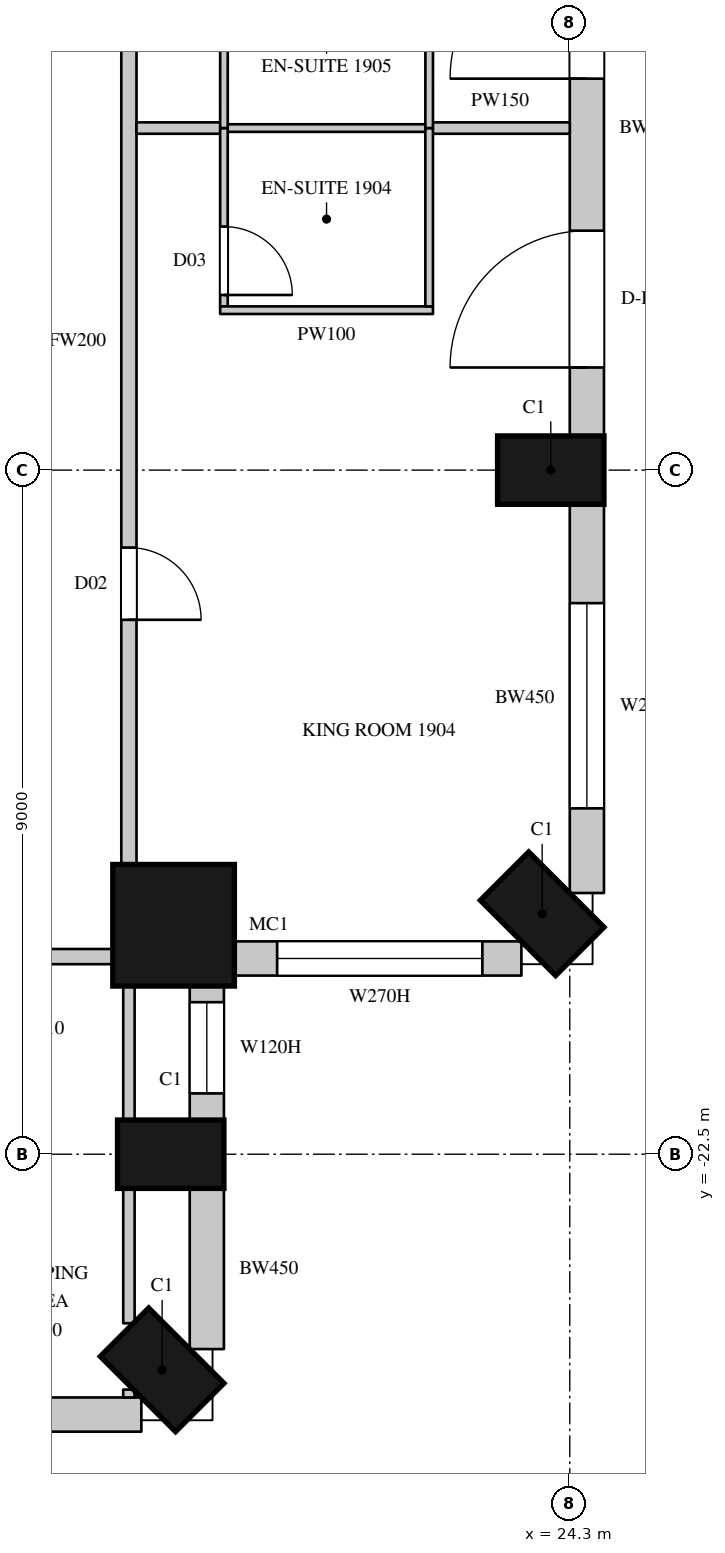
"""IFC4 building model, lengths in metres.
Left out: names, types, materials, properties, quantities, classifications, styles, units other than length and angle.
Written with IfcOpenShell. Run it as: python <this file> out.ifc"""

import sys

from ifc_helpers import new_model, si_unit, direction, frame, frame_2d, origin, origin_2d, place, context, subcontext, project, spatial, rectangle, circle, extrude, element, fill, save


model = new_model("IFC4")
c1 = context("Model", 3, precision=1e-05, world=origin(), true_north=direction((0.0, 1.0)))
c2 = subcontext(c1, "Body", "Model", "MODEL_VIEW")
j1 = project(units=[si_unit("LENGTHUNIT", "METRE"), si_unit("PLANEANGLEUNIT", "RADIAN")], contexts=[c1])
p1 = place(None, origin())
s1 = spatial("IfcSite", under=j1, at=p1, CompositionType="ELEMENT")
p2 = place(p1, origin())
s2 = spatial("IfcBuilding", under=s1, at=p2, CompositionType="ELEMENT")
p3 = place(p2, frame((0.0, 0.0, 98.7)))
s3 = spatial("IfcBuildingStorey", under=s2, at=p3, CompositionType="ELEMENT", Elevation=98.7)
for number, where, z_axis, x_axis in (
    (1, (18.937, -25.337, 0.0), (0.0, 0.0, 1.0), (0.707, 0.707, 0.0)),
    (2, (19.05, -22.5, 0.0), (0.0, 0.0, 1.0), (0.0, 1.0, 0.0)),
):
    element("IfcColumn", number, at=place(p3, frame(where, z_axis=z_axis, x_axis=x_axis)), inside=s3, PredefinedType="COLUMN", context=c2, shape_type="SweptSolid", body=[
        extrude(rectangle(XDim=0.9, YDim=1.4, at=origin_2d()), origin(), (0.0, 0.0, 1.0), 3.6),
    ])
p4 = place(p3, frame((19.088, -19.488, 0.0), z_axis=(0.0, 0.0, 1.0), x_axis=(1.0, 0.0, 0.0)))
e3 = element("IfcColumn", 3, at=p4, inside=s3, PredefinedType="COLUMN", context=c2, shape_type="SweptSolid", body=[
    extrude(circle(Radius=0.8, at=origin_2d()), origin(), (0.0, 0.0, 1.0), 3.6),
])
for number, where, z_axis, x_axis in (
    (4, (23.937, -19.337, 0.0), (0.0, 0.0, 1.0), (0.707, 0.707, 0.0)),
    (5, (24.05, -13.5, 0.0), (0.0, 0.0, 1.0), (0.0, 1.0, 0.0)),
):
    element("IfcColumn", number, at=place(p3, frame(where, z_axis=z_axis, x_axis=x_axis)), inside=s3, PredefinedType="COLUMN", context=c2, shape_type="SweptSolid", body=[
        extrude(rectangle(XDim=0.9, YDim=1.4, at=origin_2d()), origin(), (0.0, 0.0, 1.0), 3.6),
    ])
p5 = place(p3, frame((15.75, -25.925, 0.0), z_axis=(0.0, 0.0, 1.0), x_axis=(1.0, 0.0, 0.0)))
e6 = element("IfcWall", 6, at=p5, inside=s3, PredefinedType="SOLIDWALL", context=c2, shape_type="SweptSolid", body=[
    extrude(rectangle(XDim=2.914, YDim=0.45, at=frame_2d((1.457, 0.0))), origin(), (0.0, 0.0, 1.0), 3.3),
])
p6 = place(p3, frame((19.525, -25.064, 0.0), z_axis=(0.0, 0.0, 1.0), x_axis=(0.0, 1.0, 0.0)))
e7 = element("IfcWall", 7, at=p6, inside=s3, PredefinedType="SOLIDWALL", context=c2, shape_type="SweptSolid", body=[
    extrude(rectangle(XDim=2.114, YDim=0.45, at=frame_2d((1.057, 0.0))), origin(), (0.0, 0.0, 1.0), 3.3),
])
p7 = place(p3, frame((19.525, -22.05, 0.0), z_axis=(0.0, 0.0, 1.0), x_axis=(0.0, 1.0, 0.0)))
e8 = element("IfcWall", 8, at=p7, inside=s3, PredefinedType="SOLIDWALL", context=c2, shape_type="SweptSolid", body=[
    extrude(rectangle(XDim=1.792, YDim=0.45, at=frame_2d((0.896, 0.0))), origin(), (0.0, 0.0, 1.0), 3.3),
])
p8 = place(p7, frame((0.35, 0.0, 1.05)))
e9 = element("IfcOpeningElement", 9, at=p8, cuts=e8, PredefinedType="OPENING", context=c2, shape_type="SweptSolid", body=[
    extrude(rectangle(XDim=1.2, YDim=2.0, at=frame_2d((0.6, 1.0))), frame((0.0, 0.235, 0.0), z_axis=(0.0, -1.0, 0.0), x_axis=(1.0, 0.0, 0.0)), (0.0, 0.0, 1.0), 0.47),
])
p9 = place(p3, frame((19.858, -19.925, 0.0), z_axis=(0.0, 0.0, 1.0), x_axis=(1.0, 0.0, 0.0)))
e10 = element("IfcWall", 10, at=p9, inside=s3, PredefinedType="SOLIDWALL", context=c2, shape_type="SweptSolid", body=[
    extrude(rectangle(XDim=3.805, YDim=0.45, at=frame_2d((1.903, 0.0))), origin(), (0.0, 0.0, 1.0), 3.3),
])
p10 = place(p9, frame((0.592, 0.0, 1.05)))
e11 = element("IfcOpeningElement", 11, at=p10, cuts=e10, PredefinedType="OPENING", context=c2, shape_type="SweptSolid", body=[
    extrude(rectangle(XDim=2.7, YDim=2.0, at=frame_2d((1.35, 1.0))), frame((0.0, 0.235, 0.0), z_axis=(0.0, -1.0, 0.0), x_axis=(1.0, 0.0, 0.0)), (0.0, 0.0, 1.0), 0.47),
])
p11 = place(p3, frame((24.525, -19.064, 0.0), z_axis=(0.0, 0.0, 1.0), x_axis=(0.0, 1.0, 0.0)))
e12 = element("IfcWall", 12, at=p11, inside=s3, PredefinedType="SOLIDWALL", context=c2, shape_type="SweptSolid", body=[
    extrude(rectangle(XDim=5.114, YDim=0.45, at=frame_2d((2.557, 0.0))), origin(), (0.0, 0.0, 1.0), 3.3),
])
p12 = place(p11, frame((1.114, 0.0, 1.05)))
e13 = element("IfcOpeningElement", 13, at=p12, cuts=e12, PredefinedType="OPENING", context=c2, shape_type="SweptSolid", body=[
    extrude(rectangle(XDim=2.7, YDim=2.0, at=frame_2d((1.35, 1.0))), frame((0.0, 0.235, 0.0), z_axis=(0.0, -1.0, 0.0), x_axis=(1.0, 0.0, 0.0)), (0.0, 0.0, 1.0), 0.47),
])
p13 = place(p3, frame((24.525, -13.05, 0.0), z_axis=(0.0, 0.0, 1.0), x_axis=(0.0, 1.0, 0.0)))
e14 = element("IfcWall", 14, at=p13, inside=s3, PredefinedType="SOLIDWALL", context=c2, shape_type="SweptSolid", body=[
    extrude(rectangle(XDim=8.1, YDim=0.45, at=frame_2d((4.05, 0.0))), origin(), (0.0, 0.0, 1.0), 3.3),
])
p14 = place(p13, frame((0.9, 0.0, 0.0)))
e15 = element("IfcOpeningElement", 15, at=p14, cuts=e14, PredefinedType="OPENING", context=c2, shape_type="SweptSolid", body=[
    extrude(rectangle(XDim=1.8, YDim=2.4, at=frame_2d((0.9, 1.2))), frame((0.0, 0.235, 0.0), z_axis=(0.0, -1.0, 0.0), x_axis=(1.0, 0.0, 0.0)), (0.0, 0.0, 1.0), 0.47),
])
p15 = place(p13, frame((4.7, 0.0, 0.0)))
e16 = element("IfcOpeningElement", 16, at=p15, cuts=e14, PredefinedType="OPENING", context=c2, shape_type="SweptSolid", body=[
    extrude(rectangle(XDim=1.8, YDim=2.4, at=frame_2d((0.9, 1.2))), frame((0.0, 0.235, 0.0), z_axis=(0.0, -1.0, 0.0), x_axis=(1.0, 0.0, 0.0)), (0.0, 0.0, 1.0), 0.47),
])
p16 = place(p13, frame((6.7, 0.0, 1.05)))
e17 = element("IfcOpeningElement", 17, at=p16, cuts=e14, PredefinedType="OPENING", context=c2, shape_type="SweptSolid", body=[
    extrude(rectangle(XDim=1.2, YDim=2.0, at=frame_2d((0.6, 1.0))), frame((0.0, 0.235, 0.0), z_axis=(0.0, -1.0, 0.0), x_axis=(1.0, 0.0, 0.0)), (0.0, 0.0, 1.0), 0.47),
])
p17 = place(p3, frame((-23.765, -19.9, 0.0), z_axis=(0.0, 0.0, 1.0), x_axis=(1.0, 0.0, 0.0)))
e18 = element("IfcWall", 18, at=p17, inside=s3, PredefinedType="PARTITIONING", context=c2, shape_type="SweptSolid", body=[
    extrude(rectangle(XDim=42.125, YDim=0.2, at=frame_2d((21.063, 0.0))), origin(), (0.0, 0.0, 1.0), 3.3),
])
p18 = place(p17, frame((6.2, 0.0, 0.0)))
e19 = element("IfcOpeningElement", 19, at=p18, cuts=e18, PredefinedType="OPENING", context=c2, shape_type="SweptSolid", body=[
    extrude(rectangle(XDim=0.95, YDim=2.2, at=frame_2d((0.475, 1.1))), frame((0.0, 0.11, 0.0), z_axis=(0.0, -1.0, 0.0), x_axis=(1.0, 0.0, 0.0)), (0.0, 0.0, 1.0), 0.22),
])
p19 = place(p17, frame((14.1, 0.0, 0.0)))
e20 = element("IfcOpeningElement", 20, at=p19, cuts=e18, PredefinedType="OPENING", context=c2, shape_type="SweptSolid", body=[
    extrude(rectangle(XDim=1.1, YDim=2.4, at=frame_2d((0.55, 1.2))), frame((0.0, 0.11, 0.0), z_axis=(0.0, -1.0, 0.0), x_axis=(1.0, 0.0, 0.0)), (0.0, 0.0, 1.0), 0.22),
])
p20 = place(p17, frame((24.2, 0.0, 0.0)))
e21 = element("IfcOpeningElement", 21, at=p20, cuts=e18, PredefinedType="OPENING", context=c2, shape_type="SweptSolid", body=[
    extrude(rectangle(XDim=0.95, YDim=2.2, at=frame_2d((0.475, 1.1))), frame((0.0, 0.11, 0.0), z_axis=(0.0, -1.0, 0.0), x_axis=(1.0, 0.0, 0.0)), (0.0, 0.0, 1.0), 0.22),
])
p21 = place(p17, frame((32.9, 0.0, 0.0)))
e22 = element("IfcOpeningElement", 22, at=p21, cuts=e18, PredefinedType="OPENING", context=c2, shape_type="SweptSolid", body=[
    extrude(rectangle(XDim=1.1, YDim=2.4, at=frame_2d((0.55, 1.2))), frame((0.0, 0.11, 0.0), z_axis=(0.0, -1.0, 0.0), x_axis=(1.0, 0.0, 0.0)), (0.0, 0.0, 1.0), 0.22),
])
p22 = place(p3, frame((18.5, -18.869, 0.0), z_axis=(0.0, 0.0, 1.0), x_axis=(0.0, 1.0, 0.0)))
e23 = element("IfcWall", 23, at=p22, inside=s3, PredefinedType="PARTITIONING", context=c2, shape_type="SweptSolid", body=[
    extrude(rectangle(XDim=14.119, YDim=0.2, at=frame_2d((7.06, 0.0))), origin(), (0.0, 0.0, 1.0), 3.3),
])
p23 = place(p22, frame((3.4, 0.0, 0.0)))
e24 = element("IfcOpeningElement", 24, at=p23, cuts=e23, PredefinedType="OPENING", context=c2, shape_type="SweptSolid", body=[
    extrude(rectangle(XDim=0.95, YDim=2.2, at=frame_2d((0.475, 1.1))), frame((0.0, 0.11, 0.0), z_axis=(0.0, -1.0, 0.0), x_axis=(1.0, 0.0, 0.0)), (0.0, 0.0, 1.0), 0.22),
])
p24 = place(p22, frame((12.8, 0.0, 0.0)))
e25 = element("IfcOpeningElement", 25, at=p24, cuts=e23, PredefinedType="OPENING", context=c2, shape_type="SweptSolid", body=[
    extrude(rectangle(XDim=0.95, YDim=2.2, at=frame_2d((0.475, 1.1))), frame((0.0, 0.11, 0.0), z_axis=(0.0, -1.0, 0.0), x_axis=(1.0, 0.0, 0.0)), (0.0, 0.0, 1.0), 0.22),
])
p25 = place(p3, frame((18.5, -25.7, 0.0), z_axis=(0.0, 0.0, 1.0), x_axis=(0.0, 1.0, 0.0)))
e26 = element("IfcWall", 26, at=p25, inside=s3, PredefinedType="PARTITIONING", context=c2, shape_type="SweptSolid", body=[
    extrude(rectangle(XDim=0.104, YDim=0.15, at=frame_2d((0.052, 0.0))), origin(), (0.0, 0.0, 1.0), 3.3),
])
p26 = place(p3, frame((18.5, -24.724, 0.0), z_axis=(0.0, 0.0, 1.0), x_axis=(0.0, 1.0, 0.0)))
e27 = element("IfcWall", 27, at=p26, inside=s3, PredefinedType="PARTITIONING", context=c2, shape_type="SweptSolid", body=[
    extrude(rectangle(XDim=1.774, YDim=0.15, at=frame_2d((0.887, 0.0))), origin(), (0.0, 0.0, 1.0), 3.3),
])
p27 = place(p3, frame((18.5, -22.05, 0.0), z_axis=(0.0, 0.0, 1.0), x_axis=(0.0, 1.0, 0.0)))
e28 = element("IfcWall", 28, at=p27, inside=s3, PredefinedType="PARTITIONING", context=c2, shape_type="SweptSolid", body=[
    extrude(rectangle(XDim=1.964, YDim=0.15, at=frame_2d((0.982, 0.0))), origin(), (0.0, 0.0, 1.0), 3.3),
])
p28 = place(p3, frame((18.6, -9.0, 0.0), z_axis=(0.0, 0.0, 1.0), x_axis=(1.0, 0.0, 0.0)))
e29 = element("IfcWall", 29, at=p28, inside=s3, PredefinedType="PARTITIONING", context=c2, shape_type="SweptSolid", body=[
    extrude(rectangle(XDim=1.13, YDim=0.15, at=frame_2d((0.565, 0.0))), origin(), (0.0, 0.0, 1.0), 2.65),
])
p29 = place(p3, frame((22.47, -9.0, 0.0), z_axis=(0.0, 0.0, 1.0), x_axis=(1.0, 0.0, 0.0)))
e30 = element("IfcWall", 30, at=p29, inside=s3, PredefinedType="PARTITIONING", context=c2, shape_type="SweptSolid", body=[
    extrude(rectangle(XDim=1.83, YDim=0.15, at=frame_2d((0.915, 0.0))), origin(), (0.0, 0.0, 1.0), 2.65),
])
p30 = place(p3, frame((19.73, -9.0, 0.0), z_axis=(0.0, 0.0, 1.0), x_axis=(1.0, 0.0, 0.0)))
e31 = element("IfcWall", 31, at=p30, inside=s3, PredefinedType="PARTITIONING", context=c2, shape_type="SweptSolid", body=[
    extrude(rectangle(XDim=2.74, YDim=0.1, at=frame_2d((1.37, 0.0))), origin(), (0.0, 0.0, 1.0), 2.65),
])
p31 = place(p3, frame((19.75, -11.346, 0.0), z_axis=(0.0, 0.0, 1.0), x_axis=(0.0, 1.0, 0.0)))
e32 = element("IfcWall", 32, at=p31, inside=s3, PredefinedType="PARTITIONING", context=c2, shape_type="SweptSolid", body=[
    extrude(rectangle(XDim=2.346, YDim=0.1, at=frame_2d((1.173, 0.0))), origin(), (0.0, 0.0, 1.0), 3.3),
])
p32 = place(p31, frame((0.15, 0.0, 0.0)))
e33 = element("IfcOpeningElement", 33, at=p32, cuts=e32, PredefinedType="OPENING", context=c2, shape_type="SweptSolid", body=[
    extrude(rectangle(XDim=0.9, YDim=2.2, at=frame_2d((0.45, 1.1))), frame((0.0, 0.06, 0.0), z_axis=(0.0, -1.0, 0.0), x_axis=(1.0, 0.0, 0.0)), (0.0, 0.0, 1.0), 0.12),
])
p33 = place(p3, frame((19.7, -11.396, 0.0), z_axis=(0.0, 0.0, 1.0), x_axis=(1.0, 0.0, 0.0)))
e34 = element("IfcWall", 34, at=p33, inside=s3, PredefinedType="PARTITIONING", context=c2, shape_type="SweptSolid", body=[
    extrude(rectangle(XDim=2.8, YDim=0.1, at=frame_2d((1.4, 0.0))), origin(), (0.0, 0.0, 1.0), 3.3),
])
p34 = place(p3, frame((19.75, -9.0, 0.0), z_axis=(0.0, 0.0, 1.0), x_axis=(0.000399241409, 0.999999920303, 0.0)))
e35 = element("IfcWall", 35, at=p34, inside=s3, PredefinedType="PARTITIONING", context=c2, shape_type="SweptSolid", body=[
    extrude(rectangle(XDim=2.446, YDim=0.1, at=frame_2d((1.223, 0.0))), origin(), (0.0, 0.0, 1.0), 3.3),
])
p35 = place(p34, frame((1.3, 0.0, 0.0)))
e36 = element("IfcOpeningElement", 36, at=p35, cuts=e35, PredefinedType="OPENING", context=c2, shape_type="SweptSolid", body=[
    extrude(rectangle(XDim=0.9, YDim=2.2, at=frame_2d((0.45, 1.1))), frame((0.0, 0.06, 0.0), z_axis=(0.0, -1.0, 0.0), x_axis=(1.0, 0.0, 0.0)), (0.0, 0.0, 1.0), 0.12),
])
p36 = place(p3, frame((22.45, -11.346, 0.0), z_axis=(0.0, 0.0, 1.0), x_axis=(0.0, 1.0, 0.0)))
e37 = element("IfcWall", 37, at=p36, inside=s3, PredefinedType="PARTITIONING", context=c2, shape_type="SweptSolid", body=[
    extrude(rectangle(XDim=2.346, YDim=0.1, at=frame_2d((1.173, 0.0))), origin(), (0.0, 0.0, 1.0), 3.3),
])
p37 = place(p3, frame((22.45, -9.0, 0.0), z_axis=(0.0, 0.0, 1.0), x_axis=(0.00041644973, 0.999999913285, 0.0)))
e38 = element("IfcWall", 38, at=p37, inside=s3, PredefinedType="PARTITIONING", context=c2, shape_type="SweptSolid", body=[
    extrude(rectangle(XDim=2.345, YDim=0.1, at=frame_2d((1.172, 0.0))), origin(), (0.0, 0.0, 1.0), 3.3),
])
p38 = place(p8, origin())
e39 = element("IfcWindow", 39, at=p38, inside=s3, PartitioningType="SINGLE_PANEL", PredefinedType="WINDOW", context=c2, shape_type="SweptSolid", body=[
    extrude(rectangle(XDim=1.2, YDim=2.0, at=frame_2d((0.6, 1.0))), frame((0.0, 0.135, 0.0), z_axis=(0.0, -1.0, 0.0), x_axis=(1.0, 0.0, 0.0)), (0.0, 0.0, 1.0), 0.06),
])
fill(e9, e39)
p39 = place(p10, origin())
e40 = element("IfcWindow", 40, at=p39, inside=s3, PartitioningType="SINGLE_PANEL", PredefinedType="WINDOW", context=c2, shape_type="SweptSolid", body=[
    extrude(rectangle(XDim=2.7, YDim=2.0, at=frame_2d((1.35, 1.0))), frame((0.0, 0.135, 0.0), z_axis=(0.0, -1.0, 0.0), x_axis=(1.0, 0.0, 0.0)), (0.0, 0.0, 1.0), 0.06),
])
fill(e11, e40)
p40 = place(p12, origin())
e41 = element("IfcWindow", 41, at=p40, inside=s3, PartitioningType="SINGLE_PANEL", PredefinedType="WINDOW", context=c2, shape_type="SweptSolid", body=[
    extrude(rectangle(XDim=2.7, YDim=2.0, at=frame_2d((1.35, 1.0))), frame((0.0, 0.135, 0.0), z_axis=(0.0, -1.0, 0.0), x_axis=(1.0, 0.0, 0.0)), (0.0, 0.0, 1.0), 0.06),
])
fill(e13, e41)
p41 = place(p14, origin())
e42 = element("IfcDoor", 42, at=p41, inside=s3, OperationType="SLIDING_TO_LEFT", PredefinedType="DOOR", context=c2, shape_type="SweptSolid", body=[
    extrude(rectangle(XDim=1.8, YDim=2.4, at=frame_2d((0.9, 1.2))), frame((0.0, 0.13, 0.0), z_axis=(0.0, -1.0, 0.0), x_axis=(1.0, 0.0, 0.0)), (0.0, 0.0, 1.0), 0.05),
])
fill(e15, e42)
p42 = place(p15, origin())
e43 = element("IfcDoor", 43, at=p42, inside=s3, OperationType="SLIDING_TO_LEFT", PredefinedType="DOOR", context=c2, shape_type="SweptSolid", body=[
    extrude(rectangle(XDim=1.8, YDim=2.4, at=frame_2d((0.9, 1.2))), frame((0.0, 0.13, 0.0), z_axis=(0.0, -1.0, 0.0), x_axis=(1.0, 0.0, 0.0)), (0.0, 0.0, 1.0), 0.05),
])
fill(e16, e43)
p43 = place(p23, origin())
e44 = element("IfcDoor", 44, at=p43, inside=s3, OperationType="SINGLE_SWING_RIGHT", PredefinedType="DOOR", context=c2, shape_type="SweptSolid", body=[
    extrude(rectangle(XDim=0.95, YDim=2.2, at=frame_2d((0.475, 1.1))), frame((0.0, 0.025, 0.0), z_axis=(0.0, -1.0, 0.0), x_axis=(1.0, 0.0, 0.0)), (0.0, 0.0, 1.0), 0.05),
])
fill(e24, e44)
p44 = place(p32, origin())
e45 = element("IfcDoor", 45, at=p44, inside=s3, OperationType="SINGLE_SWING_RIGHT", PredefinedType="DOOR", context=c2, shape_type="SweptSolid", body=[
    extrude(rectangle(XDim=0.9, YDim=2.2, at=frame_2d((0.45, 1.1))), frame((0.0, 0.025, 0.0), z_axis=(0.0, -1.0, 0.0), x_axis=(1.0, 0.0, 0.0)), (0.0, 0.0, 1.0), 0.05),
])
fill(e33, e45)
save(model, sys.argv[1])
